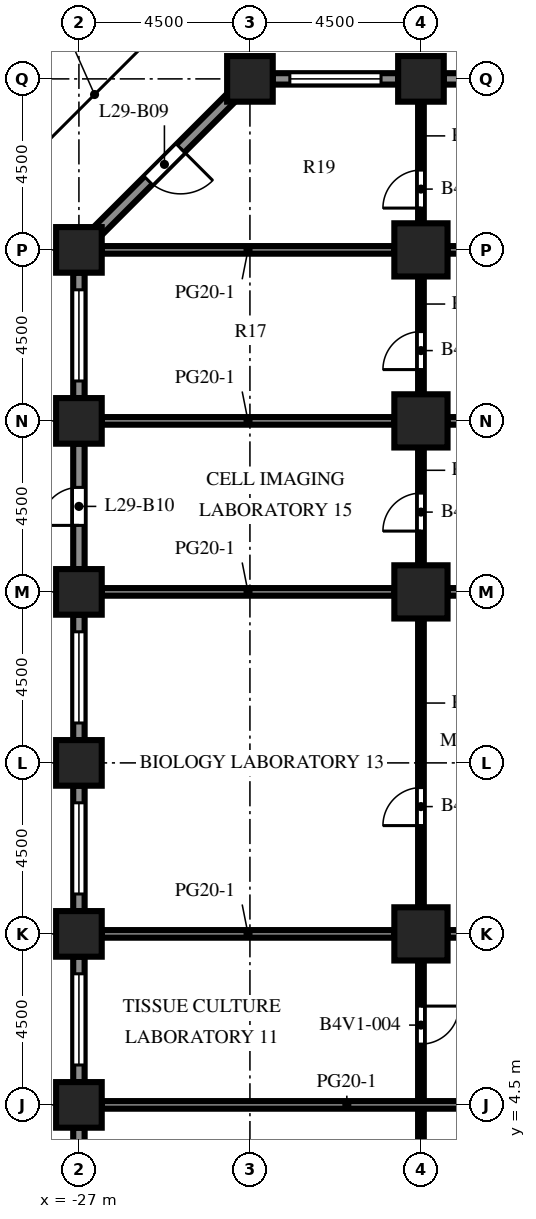
"""IFC4 building model, lengths in metres.
Left out: names, types, materials, properties, quantities, classifications, styles, units other than length and angle.
Written with IfcOpenShell. Run it as: python <this file> out.ifc"""

import sys

from ifc_helpers import new_model, si_unit, direction, frame, frame_2d, origin, origin_2d, place, context, subcontext, project, spatial, rectangle, extrude, element, fill, save


model = new_model("IFC4")
c1 = context("Model", 3, precision=1e-05, world=origin(), true_north=direction((0.0, 1.0)))
c2 = subcontext(c1, "Body", "Model", "MODEL_VIEW")
j1 = project(units=[si_unit("LENGTHUNIT", "METRE"), si_unit("PLANEANGLEUNIT", "RADIAN")], contexts=[c1])
p1 = place(None, origin())
s1 = spatial("IfcSite", under=j1, at=p1, CompositionType="ELEMENT")
p2 = place(p1, origin())
s2 = spatial("IfcBuilding", under=s1, at=p2, CompositionType="ELEMENT")
p3 = place(p2, frame((0.0, 0.0, 129.0)))
s3 = spatial("IfcBuildingStorey", under=s2, at=p3, CompositionType="ELEMENT", Elevation=129.0)
for number, where, z_axis, x_axis in (
    (1, (-27.0, 4.5, 0.0), (0.0, 0.0, 1.0), (1.0, 0.0, 0.0)),
    (2, (-27.0, 9.0, 0.0), (0.0, 0.0, 1.0), (1.0, 0.0, 0.0)),
    (3, (-27.0, 13.5, 0.0), (0.0, 0.0, 1.0), (1.0, 0.0, 0.0)),
    (4, (-27.0, 18.0, 0.0), (0.0, 0.0, 1.0), (1.0, 0.0, 0.0)),
    (5, (-27.0, 22.5, 0.0), (0.0, 0.0, 1.0), (1.0, 0.0, 0.0)),
    (6, (-27.0, 27.0, 0.0), (0.0, 0.0, 1.0), (1.0, 0.0, 0.0)),
    (7, (-22.5, 31.5, 0.0), (0.0, 0.0, 1.0), (1.0, 0.0, 0.0)),
    (8, (-18.0, 31.5, 0.0), (0.0, 0.0, 1.0), (1.0, 0.0, 0.0)),
):
    element("IfcColumn", number, at=place(p3, frame(where, z_axis=z_axis, x_axis=x_axis)), inside=s3, PredefinedType="COLUMN", context=c2, shape_type="SweptSolid", body=[
        extrude(rectangle(XDim=1.2, YDim=1.2, at=origin_2d()), origin(), (0.0, 0.0, 1.0), 4.1),
    ])
for number, where, z_axis, x_axis in (
    (9, (-18.0, 9.0, 0.0), (0.0, 0.0, 1.0), (1.0, 0.0, 0.0)),
    (10, (-18.0, 18.0, 0.0), (0.0, 0.0, 1.0), (1.0, 0.0, 0.0)),
    (11, (-18.0, 22.5, 0.0), (0.0, 0.0, 1.0), (1.0, 0.0, 0.0)),
    (12, (-18.0, 27.0, 0.0), (0.0, 0.0, 1.0), (1.0, 0.0, 0.0)),
):
    element("IfcColumn", number, at=place(p3, frame(where, z_axis=z_axis, x_axis=x_axis)), inside=s3, PredefinedType="COLUMN", context=c2, shape_type="SweptSolid", body=[
        extrude(rectangle(XDim=1.4, YDim=1.4, at=origin_2d()), origin(), (0.0, 0.0, 1.0), 4.1),
    ])
p4 = place(p3, frame((-17.4, 31.5, 0.0), z_axis=(0.0, 0.0, 1.0), x_axis=(1.0, 0.0, 0.0)))
e13 = element("IfcWall", 13, at=p4, inside=s3, PredefinedType="SOLIDWALL", context=c2, shape_type="SweptSolid", body=[
    extrude(rectangle(XDim=3.3, YDim=0.3, at=frame_2d((1.65, 0.0))), origin(), (0.0, 0.0, 1.0), 2.75),
])
p5 = place(p4, frame((1.15, 0.0, 0.0)))
e14 = element("IfcOpeningElement", 14, at=p5, cuts=e13, PredefinedType="OPENING", context=c2, shape_type="SweptSolid", body=[
    extrude(rectangle(XDim=1.0, YDim=2.2, at=frame_2d((0.5, 1.1))), frame((0.0, 0.16, 0.0), z_axis=(0.0, -1.0, 0.0), x_axis=(1.0, 0.0, 0.0)), (0.0, 0.0, 1.0), 0.32),
])
p6 = place(p3, frame((-21.9, 31.5, 0.0), z_axis=(0.0, 0.0, 1.0), x_axis=(1.0, 0.0, 0.0)))
e15 = element("IfcWall", 15, at=p6, inside=s3, PredefinedType="SOLIDWALL", context=c2, shape_type="SweptSolid", body=[
    extrude(rectangle(XDim=3.3, YDim=0.3, at=frame_2d((1.65, 0.0))), origin(), (0.0, 0.0, 1.0), 2.75),
])
p7 = place(p6, frame((0.45, 0.0, 0.8)))
e16 = element("IfcOpeningElement", 16, at=p7, cuts=e15, PredefinedType="OPENING", context=c2, shape_type="SweptSolid", body=[
    extrude(rectangle(XDim=2.4, YDim=1.7, at=frame_2d((1.2, 0.85))), frame((0.0, 0.16, 0.0), z_axis=(0.0, -1.0, 0.0), x_axis=(1.0, 0.0, 0.0)), (0.0, 0.0, 1.0), 0.32),
])
p8 = place(p3, frame((-26.506, 27.494, 0.0), z_axis=(0.0, 0.0, 1.0), x_axis=(0.707106781187, 0.707106781187, 0.0)))
e17 = element("IfcWall", 17, at=p8, inside=s3, PredefinedType="SOLIDWALL", context=c2, shape_type="SweptSolid", body=[
    extrude(rectangle(XDim=4.967, YDim=0.3, at=frame_2d((2.483, 0.0))), origin(), (0.0, 0.0, 1.0), 2.75),
])
p9 = place(p8, frame((1.884, 0.0, 0.0)))
e18 = element("IfcOpeningElement", 18, at=p9, cuts=e17, PredefinedType="OPENING", context=c2, shape_type="SweptSolid", body=[
    extrude(rectangle(XDim=1.2, YDim=2.2, at=frame_2d((0.6, 1.1))), frame((0.0, 0.16, 0.0), z_axis=(0.0, -1.0, 0.0), x_axis=(1.0, 0.0, 0.0)), (0.0, 0.0, 1.0), 0.32),
])
p10 = place(p3, frame((-27.0, 23.1, 0.0), z_axis=(0.0, 0.0, 1.0), x_axis=(0.0, 1.0, 0.0)))
e19 = element("IfcWall", 19, at=p10, inside=s3, PredefinedType="SOLIDWALL", context=c2, shape_type="SweptSolid", body=[
    extrude(rectangle(XDim=3.3, YDim=0.3, at=frame_2d((1.65, 0.0))), origin(), (0.0, 0.0, 1.0), 2.75),
])
p11 = place(p10, frame((0.45, 0.0, 0.8)))
e20 = element("IfcOpeningElement", 20, at=p11, cuts=e19, PredefinedType="OPENING", context=c2, shape_type="SweptSolid", body=[
    extrude(rectangle(XDim=2.4, YDim=1.7, at=frame_2d((1.2, 0.85))), frame((0.0, 0.16, 0.0), z_axis=(0.0, -1.0, 0.0), x_axis=(1.0, 0.0, 0.0)), (0.0, 0.0, 1.0), 0.32),
])
p12 = place(p3, frame((-27.0, 18.6, 0.0), z_axis=(0.0, 0.0, 1.0), x_axis=(0.0, 1.0, 0.0)))
e21 = element("IfcWall", 21, at=p12, inside=s3, PredefinedType="SOLIDWALL", context=c2, shape_type="SweptSolid", body=[
    extrude(rectangle(XDim=3.3, YDim=0.3, at=frame_2d((1.65, 0.0))), origin(), (0.0, 0.0, 1.0), 2.75),
])
p13 = place(p12, frame((1.15, 0.0, 0.0)))
e22 = element("IfcOpeningElement", 22, at=p13, cuts=e21, PredefinedType="OPENING", context=c2, shape_type="SweptSolid", body=[
    extrude(rectangle(XDim=1.0, YDim=2.2, at=frame_2d((0.5, 1.1))), frame((0.0, 0.16, 0.0), z_axis=(0.0, -1.0, 0.0), x_axis=(1.0, 0.0, 0.0)), (0.0, 0.0, 1.0), 0.32),
])
p14 = place(p3, frame((-27.0, 14.1, 0.0), z_axis=(0.0, 0.0, 1.0), x_axis=(0.0, 1.0, 0.0)))
e23 = element("IfcWall", 23, at=p14, inside=s3, PredefinedType="SOLIDWALL", context=c2, shape_type="SweptSolid", body=[
    extrude(rectangle(XDim=3.3, YDim=0.3, at=frame_2d((1.65, 0.0))), origin(), (0.0, 0.0, 1.0), 2.75),
])
p15 = place(p14, frame((0.45, 0.0, 0.8)))
e24 = element("IfcOpeningElement", 24, at=p15, cuts=e23, PredefinedType="OPENING", context=c2, shape_type="SweptSolid", body=[
    extrude(rectangle(XDim=2.4, YDim=1.7, at=frame_2d((1.2, 0.85))), frame((0.0, 0.16, 0.0), z_axis=(0.0, -1.0, 0.0), x_axis=(1.0, 0.0, 0.0)), (0.0, 0.0, 1.0), 0.32),
])
p16 = place(p3, frame((-27.0, 9.6, 0.0), z_axis=(0.0, 0.0, 1.0), x_axis=(0.0, 1.0, 0.0)))
e25 = element("IfcWall", 25, at=p16, inside=s3, PredefinedType="SOLIDWALL", context=c2, shape_type="SweptSolid", body=[
    extrude(rectangle(XDim=3.3, YDim=0.3, at=frame_2d((1.65, 0.0))), origin(), (0.0, 0.0, 1.0), 2.75),
])
p17 = place(p16, frame((0.45, 0.0, 0.8)))
e26 = element("IfcOpeningElement", 26, at=p17, cuts=e25, PredefinedType="OPENING", context=c2, shape_type="SweptSolid", body=[
    extrude(rectangle(XDim=2.4, YDim=1.7, at=frame_2d((1.2, 0.85))), frame((0.0, 0.16, 0.0), z_axis=(0.0, -1.0, 0.0), x_axis=(1.0, 0.0, 0.0)), (0.0, 0.0, 1.0), 0.32),
])
p18 = place(p3, frame((-27.0, 5.1, 0.0), z_axis=(0.0, 0.0, 1.0), x_axis=(0.0, 1.0, 0.0)))
e27 = element("IfcWall", 27, at=p18, inside=s3, PredefinedType="SOLIDWALL", context=c2, shape_type="SweptSolid", body=[
    extrude(rectangle(XDim=3.3, YDim=0.3, at=frame_2d((1.65, 0.0))), origin(), (0.0, 0.0, 1.0), 2.75),
])
p19 = place(p18, frame((0.45, 0.0, 0.8)))
e28 = element("IfcOpeningElement", 28, at=p19, cuts=e27, PredefinedType="OPENING", context=c2, shape_type="SweptSolid", body=[
    extrude(rectangle(XDim=2.4, YDim=1.7, at=frame_2d((1.2, 0.85))), frame((0.0, 0.16, 0.0), z_axis=(0.0, -1.0, 0.0), x_axis=(1.0, 0.0, 0.0)), (0.0, 0.0, 1.0), 0.32),
])
p20 = place(p3, frame((-27.0, 0.6, 0.0), z_axis=(0.0, 0.0, 1.0), x_axis=(0.0, 1.0, 0.0)))
e29 = element("IfcWall", 29, at=p20, inside=s3, PredefinedType="SOLIDWALL", context=c2, shape_type="SweptSolid", body=[
    extrude(rectangle(XDim=3.3, YDim=0.3, at=frame_2d((1.65, 0.0))), origin(), (0.0, 0.0, 1.0), 2.75),
])
p21 = place(p20, frame((0.45, 0.0, 0.8)))
e30 = element("IfcOpeningElement", 30, at=p21, cuts=e29, PredefinedType="OPENING", context=c2, shape_type="SweptSolid", body=[
    extrude(rectangle(XDim=2.4, YDim=1.7, at=frame_2d((1.2, 0.85))), frame((0.0, 0.16, 0.0), z_axis=(0.0, -1.0, 0.0), x_axis=(1.0, 0.0, 0.0)), (0.0, 0.0, 1.0), 0.32),
])
p22 = place(p3, frame((-18.0, 0.7, 0.0), z_axis=(0.0, 0.0, 1.0), x_axis=(0.0, 1.0, 0.0)))
e31 = element("IfcWall", 31, at=p22, inside=s3, PredefinedType="PARTITIONING", context=c2, shape_type="SweptSolid", body=[
    extrude(rectangle(XDim=7.6, YDim=0.15, at=frame_2d((3.8, 0.0))), origin(), (0.0, 0.0, 1.0), 3.65),
])
p23 = place(p22, frame((5.4, 0.0, 0.0)))
e32 = element("IfcOpeningElement", 32, at=p23, cuts=e31, PredefinedType="OPENING", context=c2, shape_type="SweptSolid", body=[
    extrude(rectangle(XDim=1.0, YDim=2.1, at=frame_2d((0.5, 1.05))), frame((0.0, 0.085, 0.0), z_axis=(0.0, -1.0, 0.0), x_axis=(1.0, 0.0, 0.0)), (0.0, 0.0, 1.0), 0.17),
])
p24 = place(p3, frame((-18.0, 9.7, 0.0), z_axis=(0.0, 0.0, 1.0), x_axis=(0.0, 1.0, 0.0)))
e33 = element("IfcWall", 33, at=p24, inside=s3, PredefinedType="PARTITIONING", context=c2, shape_type="SweptSolid", body=[
    extrude(rectangle(XDim=7.6, YDim=0.15, at=frame_2d((3.8, 0.0))), origin(), (0.0, 0.0, 1.0), 3.65),
])
p25 = place(p24, frame((2.15, 0.0, 0.0)))
e34 = element("IfcOpeningElement", 34, at=p25, cuts=e33, PredefinedType="OPENING", context=c2, shape_type="SweptSolid", body=[
    extrude(rectangle(XDim=1.0, YDim=2.1, at=frame_2d((0.5, 1.05))), frame((0.0, 0.085, 0.0), z_axis=(0.0, -1.0, 0.0), x_axis=(1.0, 0.0, 0.0)), (0.0, 0.0, 1.0), 0.17),
])
p26 = place(p3, frame((-18.0, 18.7, 0.0), z_axis=(0.0, 0.0, 1.0), x_axis=(0.0, 1.0, 0.0)))
e35 = element("IfcWall", 35, at=p26, inside=s3, PredefinedType="PARTITIONING", context=c2, shape_type="SweptSolid", body=[
    extrude(rectangle(XDim=3.1, YDim=0.15, at=frame_2d((1.55, 0.0))), origin(), (0.0, 0.0, 1.0), 3.65),
])
p27 = place(p26, frame((0.9, 0.0, 0.0)))
e36 = element("IfcOpeningElement", 36, at=p27, cuts=e35, PredefinedType="OPENING", context=c2, shape_type="SweptSolid", body=[
    extrude(rectangle(XDim=1.0, YDim=2.1, at=frame_2d((0.5, 1.05))), frame((0.0, 0.085, 0.0), z_axis=(0.0, -1.0, 0.0), x_axis=(1.0, 0.0, 0.0)), (0.0, 0.0, 1.0), 0.17),
])
p28 = place(p3, frame((-18.0, 23.2, 0.0), z_axis=(0.0, 0.0, 1.0), x_axis=(0.0, 1.0, 0.0)))
e37 = element("IfcWall", 37, at=p28, inside=s3, PredefinedType="PARTITIONING", context=c2, shape_type="SweptSolid", body=[
    extrude(rectangle(XDim=3.1, YDim=0.15, at=frame_2d((1.55, 0.0))), origin(), (0.0, 0.0, 1.0), 3.65),
])
p29 = place(p28, frame((0.65, 0.0, 0.0)))
e38 = element("IfcOpeningElement", 38, at=p29, cuts=e37, PredefinedType="OPENING", context=c2, shape_type="SweptSolid", body=[
    extrude(rectangle(XDim=1.0, YDim=2.1, at=frame_2d((0.5, 1.05))), frame((0.0, 0.085, 0.0), z_axis=(0.0, -1.0, 0.0), x_axis=(1.0, 0.0, 0.0)), (0.0, 0.0, 1.0), 0.17),
])
p30 = place(p3, frame((-18.0, 27.7, 0.0), z_axis=(0.0, 0.0, 1.0), x_axis=(0.0, 1.0, 0.0)))
e39 = element("IfcWall", 39, at=p30, inside=s3, PredefinedType="PARTITIONING", context=c2, shape_type="SweptSolid", body=[
    extrude(rectangle(XDim=3.2, YDim=0.15, at=frame_2d((1.6, 0.0))), origin(), (0.0, 0.0, 1.0), 3.65),
])
p31 = place(p30, frame((0.4, 0.0, 0.0)))
e40 = element("IfcOpeningElement", 40, at=p31, cuts=e39, PredefinedType="OPENING", context=c2, shape_type="SweptSolid", body=[
    extrude(rectangle(XDim=1.0, YDim=2.1, at=frame_2d((0.5, 1.05))), frame((0.0, 0.085, 0.0), z_axis=(0.0, -1.0, 0.0), x_axis=(1.0, 0.0, 0.0)), (0.0, 0.0, 1.0), 0.17),
])
p32 = place(p3, frame((-26.4, 4.5, 0.0), z_axis=(0.0, 0.0, 1.0), x_axis=(1.0, 0.0, 0.0)))
e41 = element("IfcWall", 41, at=p32, inside=s3, PredefinedType="PARTITIONING", context=c2, shape_type="SweptSolid", body=[
    extrude(rectangle(XDim=12.9, YDim=0.2, at=frame_2d((6.45, 0.0))), origin(), (0.0, 0.0, 1.0), 3.65),
])
p33 = place(p3, frame((-26.4, 9.0, 0.0), z_axis=(0.0, 0.0, 1.0), x_axis=(1.0, 0.0, 0.0)))
e42 = element("IfcWall", 42, at=p33, inside=s3, PredefinedType="PARTITIONING", context=c2, shape_type="SweptSolid", body=[
    extrude(rectangle(XDim=7.7, YDim=0.2, at=frame_2d((3.85, 0.0))), origin(), (0.0, 0.0, 1.0), 3.65),
])
p34 = place(p3, frame((-17.3, 9.0, 0.0), z_axis=(0.0, 0.0, 1.0), x_axis=(1.0, 0.0, 0.0)))
e43 = element("IfcWall", 43, at=p34, inside=s3, PredefinedType="PARTITIONING", context=c2, shape_type="SweptSolid", body=[
    extrude(rectangle(XDim=3.8, YDim=0.2, at=frame_2d((1.9, 0.0))), origin(), (0.0, 0.0, 1.0), 3.65),
])
p35 = place(p3, frame((-26.4, 18.0, 0.0), z_axis=(0.0, 0.0, 1.0), x_axis=(1.0, 0.0, 0.0)))
e44 = element("IfcWall", 44, at=p35, inside=s3, PredefinedType="PARTITIONING", context=c2, shape_type="SweptSolid", body=[
    extrude(rectangle(XDim=7.7, YDim=0.2, at=frame_2d((3.85, 0.0))), origin(), (0.0, 0.0, 1.0), 3.65),
])
p36 = place(p3, frame((-17.3, 18.0, 0.0), z_axis=(0.0, 0.0, 1.0), x_axis=(1.0, 0.0, 0.0)))
e45 = element("IfcWall", 45, at=p36, inside=s3, PredefinedType="PARTITIONING", context=c2, shape_type="SweptSolid", body=[
    extrude(rectangle(XDim=3.8, YDim=0.2, at=frame_2d((1.9, 0.0))), origin(), (0.0, 0.0, 1.0), 3.65),
])
p37 = place(p3, frame((-26.4, 22.5, 0.0), z_axis=(0.0, 0.0, 1.0), x_axis=(1.0, 0.0, 0.0)))
e46 = element("IfcWall", 46, at=p37, inside=s3, PredefinedType="PARTITIONING", context=c2, shape_type="SweptSolid", body=[
    extrude(rectangle(XDim=7.7, YDim=0.2, at=frame_2d((3.85, 0.0))), origin(), (0.0, 0.0, 1.0), 3.65),
])
p38 = place(p3, frame((-17.3, 22.5, 0.0), z_axis=(0.0, 0.0, 1.0), x_axis=(1.0, 0.0, 0.0)))
e47 = element("IfcWall", 47, at=p38, inside=s3, PredefinedType="PARTITIONING", context=c2, shape_type="SweptSolid", body=[
    extrude(rectangle(XDim=3.8, YDim=0.2, at=frame_2d((1.9, 0.0))), origin(), (0.0, 0.0, 1.0), 3.65),
])
p39 = place(p3, frame((-26.4, 27.0, 0.0), z_axis=(0.0, 0.0, 1.0), x_axis=(1.0, 0.0, 0.0)))
e48 = element("IfcWall", 48, at=p39, inside=s3, PredefinedType="PARTITIONING", context=c2, shape_type="SweptSolid", body=[
    extrude(rectangle(XDim=7.7, YDim=0.2, at=frame_2d((3.85, 0.0))), origin(), (0.0, 0.0, 1.0), 3.65),
])
p40 = place(p3, frame((-17.3, 27.0, 0.0), z_axis=(0.0, 0.0, 1.0), x_axis=(1.0, 0.0, 0.0)))
e49 = element("IfcWall", 49, at=p40, inside=s3, PredefinedType="PARTITIONING", context=c2, shape_type="SweptSolid", body=[
    extrude(rectangle(XDim=3.8, YDim=0.2, at=frame_2d((1.9, 0.0))), origin(), (0.0, 0.0, 1.0), 3.65),
])
p41 = place(p7, origin())
e50 = element("IfcWindow", 50, at=p41, inside=s3, PartitioningType="SINGLE_PANEL", PredefinedType="WINDOW", context=c2, shape_type="SweptSolid", body=[
    extrude(rectangle(XDim=2.4, YDim=1.7, at=frame_2d((1.2, 0.85))), frame((0.0, 0.03, 0.0), z_axis=(0.0, -1.0, 0.0), x_axis=(1.0, 0.0, 0.0)), (0.0, 0.0, 1.0), 0.06),
])
fill(e16, e50)
p42 = place(p9, origin())
e51 = element("IfcDoor", 51, at=p42, inside=s3, OperationType="SINGLE_SWING_RIGHT", PredefinedType="DOOR", context=c2, shape_type="SweptSolid", body=[
    extrude(rectangle(XDim=1.2, YDim=2.2, at=frame_2d((0.6, 1.1))), frame((0.0, 0.025, 0.0), z_axis=(0.0, -1.0, 0.0), x_axis=(1.0, 0.0, 0.0)), (0.0, 0.0, 1.0), 0.05),
])
fill(e18, e51)
p43 = place(p11, origin())
e52 = element("IfcWindow", 52, at=p43, inside=s3, PartitioningType="SINGLE_PANEL", PredefinedType="WINDOW", context=c2, shape_type="SweptSolid", body=[
    extrude(rectangle(XDim=2.4, YDim=1.7, at=frame_2d((1.2, 0.85))), frame((0.0, 0.03, 0.0), z_axis=(0.0, -1.0, 0.0), x_axis=(1.0, 0.0, 0.0)), (0.0, 0.0, 1.0), 0.06),
])
fill(e20, e52)
p44 = place(p13, origin())
e53 = element("IfcDoor", 53, at=p44, inside=s3, OperationType="SINGLE_SWING_LEFT", PredefinedType="DOOR", context=c2, shape_type="SweptSolid", body=[
    extrude(rectangle(XDim=1.0, YDim=2.2, at=frame_2d((0.5, 1.1))), frame((0.0, 0.025, 0.0), z_axis=(0.0, -1.0, 0.0), x_axis=(1.0, 0.0, 0.0)), (0.0, 0.0, 1.0), 0.05),
])
fill(e22, e53)
p45 = place(p15, origin())
e54 = element("IfcWindow", 54, at=p45, inside=s3, PartitioningType="SINGLE_PANEL", PredefinedType="WINDOW", context=c2, shape_type="SweptSolid", body=[
    extrude(rectangle(XDim=2.4, YDim=1.7, at=frame_2d((1.2, 0.85))), frame((0.0, 0.03, 0.0), z_axis=(0.0, -1.0, 0.0), x_axis=(1.0, 0.0, 0.0)), (0.0, 0.0, 1.0), 0.06),
])
fill(e24, e54)
p46 = place(p17, origin())
e55 = element("IfcWindow", 55, at=p46, inside=s3, PartitioningType="SINGLE_PANEL", PredefinedType="WINDOW", context=c2, shape_type="SweptSolid", body=[
    extrude(rectangle(XDim=2.4, YDim=1.7, at=frame_2d((1.2, 0.85))), frame((0.0, 0.03, 0.0), z_axis=(0.0, -1.0, 0.0), x_axis=(1.0, 0.0, 0.0)), (0.0, 0.0, 1.0), 0.06),
])
fill(e26, e55)
p47 = place(p19, origin())
e56 = element("IfcWindow", 56, at=p47, inside=s3, PartitioningType="SINGLE_PANEL", PredefinedType="WINDOW", context=c2, shape_type="SweptSolid", body=[
    extrude(rectangle(XDim=2.4, YDim=1.7, at=frame_2d((1.2, 0.85))), frame((0.0, 0.03, 0.0), z_axis=(0.0, -1.0, 0.0), x_axis=(1.0, 0.0, 0.0)), (0.0, 0.0, 1.0), 0.06),
])
fill(e28, e56)
p48 = place(p23, origin())
e57 = element("IfcDoor", 57, at=p48, inside=s3, OperationType="SINGLE_SWING_RIGHT", PredefinedType="DOOR", context=c2, shape_type="SweptSolid", body=[
    extrude(rectangle(XDim=1.0, YDim=2.1, at=frame_2d((0.5, 1.05))), frame((0.0, 0.025, 0.0), z_axis=(0.0, -1.0, 0.0), x_axis=(1.0, 0.0, 0.0)), (0.0, 0.0, 1.0), 0.05),
])
fill(e32, e57)
p49 = place(p25, origin())
e58 = element("IfcDoor", 58, at=p49, inside=s3, OperationType="SINGLE_SWING_LEFT", PredefinedType="DOOR", context=c2, shape_type="SweptSolid", body=[
    extrude(rectangle(XDim=1.0, YDim=2.1, at=frame_2d((0.5, 1.05))), frame((0.0, 0.025, 0.0), z_axis=(0.0, -1.0, 0.0), x_axis=(1.0, 0.0, 0.0)), (0.0, 0.0, 1.0), 0.05),
])
fill(e34, e58)
p50 = place(p27, origin())
e59 = element("IfcDoor", 59, at=p50, inside=s3, OperationType="SINGLE_SWING_LEFT", PredefinedType="DOOR", context=c2, shape_type="SweptSolid", body=[
    extrude(rectangle(XDim=1.0, YDim=2.1, at=frame_2d((0.5, 1.05))), frame((0.0, 0.025, 0.0), z_axis=(0.0, -1.0, 0.0), x_axis=(1.0, 0.0, 0.0)), (0.0, 0.0, 1.0), 0.05),
])
fill(e36, e59)
p51 = place(p29, origin())
e60 = element("IfcDoor", 60, at=p51, inside=s3, OperationType="SINGLE_SWING_LEFT", PredefinedType="DOOR", context=c2, shape_type="SweptSolid", body=[
    extrude(rectangle(XDim=1.0, YDim=2.1, at=frame_2d((0.5, 1.05))), frame((0.0, 0.025, 0.0), z_axis=(0.0, -1.0, 0.0), x_axis=(1.0, 0.0, 0.0)), (0.0, 0.0, 1.0), 0.05),
])
fill(e38, e60)
p52 = place(p31, origin())
e61 = element("IfcDoor", 61, at=p52, inside=s3, OperationType="SINGLE_SWING_LEFT", PredefinedType="DOOR", context=c2, shape_type="SweptSolid", body=[
    extrude(rectangle(XDim=1.0, YDim=2.1, at=frame_2d((0.5, 1.05))), frame((0.0, 0.025, 0.0), z_axis=(0.0, -1.0, 0.0), x_axis=(1.0, 0.0, 0.0)), (0.0, 0.0, 1.0), 0.05),
])
fill(e40, e61)
save(model, sys.argv[1])
